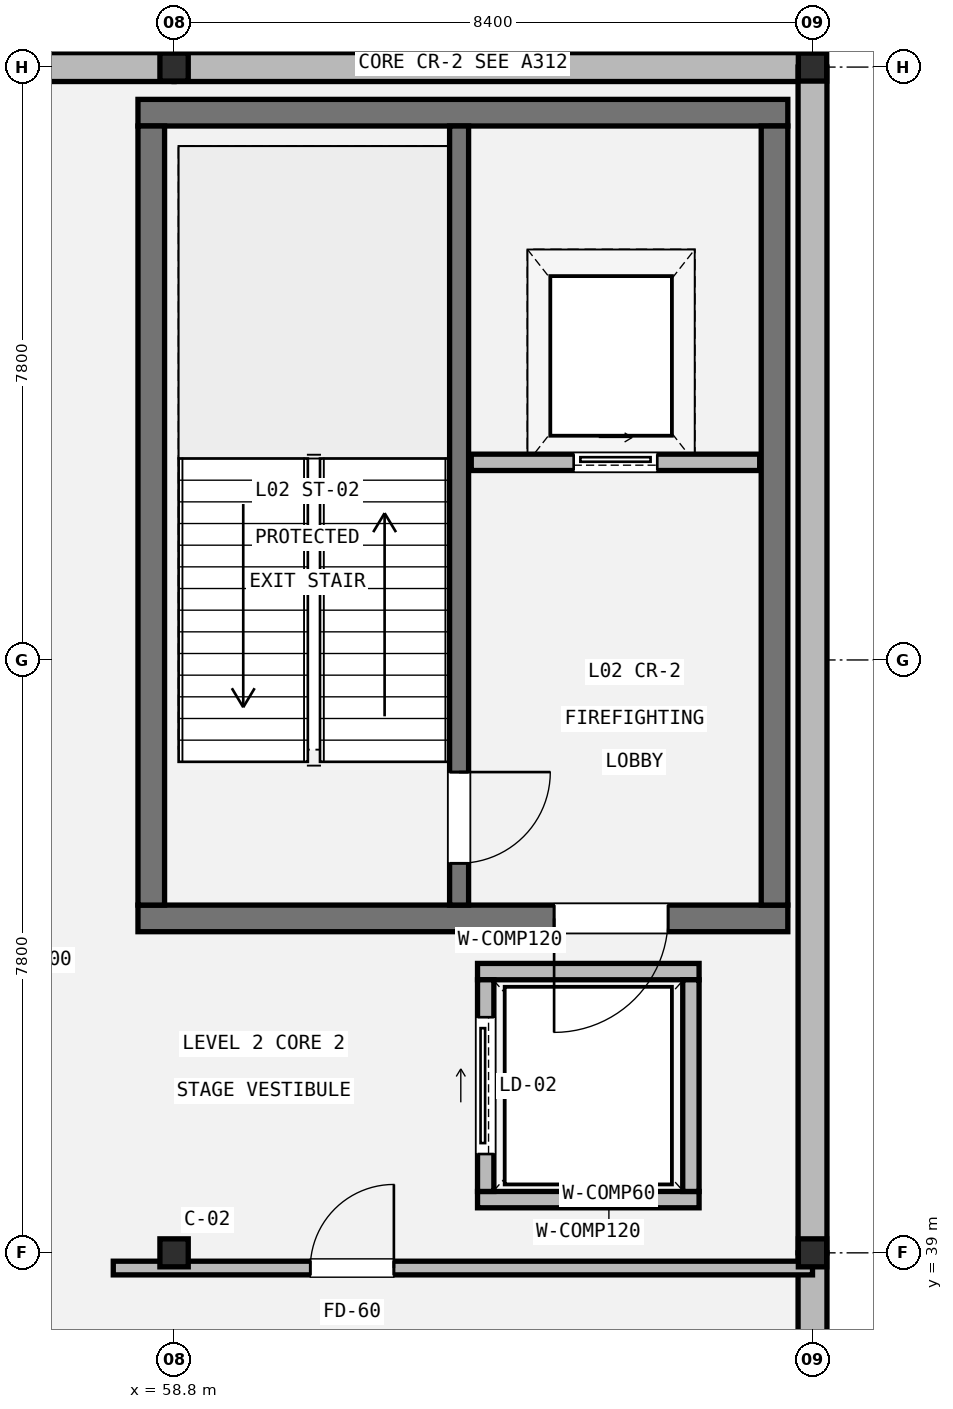
"""IFC4 building model, lengths in metres.
Left out: names, types, materials, properties, quantities, classifications, styles, units other than length and angle.
Written with IfcOpenShell. Run it as: python <this file> out.ifc"""

import sys

from ifc_helpers import new_model, si_unit, direction, frame, frame_2d, origin, origin_2d, place, context, subcontext, project, spatial, rectangle, i_section, extrude, element, fill, save


model = new_model("IFC4")
c1 = context("Model", 3, precision=1e-05, world=origin(), true_north=direction((0.0, 1.0)))
c2 = subcontext(c1, "Body", "Model", "MODEL_VIEW")
j1 = project(units=[si_unit("LENGTHUNIT", "METRE"), si_unit("PLANEANGLEUNIT", "RADIAN")], contexts=[c1])
p1 = place(None, origin())
s1 = spatial("IfcSite", under=j1, at=p1, CompositionType="ELEMENT")
p2 = place(p1, origin())
s2 = spatial("IfcBuilding", under=s1, at=p2, CompositionType="ELEMENT")
p3 = place(p2, frame((0.0, 0.0, 10.2)))
s3 = spatial("IfcBuildingStorey", under=s2, at=p3, CompositionType="ELEMENT", Elevation=10.2)
for number, where, z_axis, x_axis in (
    (1, (58.8, 39.0, 0.0), (0.0, 0.0, 1.0), (1.0, 0.0, 0.0)),
    (2, (58.8, 54.6, 0.0), (0.0, 0.0, 1.0), (1.0, 0.0, 0.0)),
    (3, (67.2, 39.0, 0.0), (0.0, 0.0, 1.0), (1.0, 0.0, 0.0)),
    (4, (67.2, 54.6, 0.0), (0.0, 0.0, 1.0), (1.0, 0.0, 0.0)),
):
    element("IfcColumn", number, at=place(p3, frame(where, z_axis=z_axis, x_axis=x_axis)), inside=s3, PredefinedType="COLUMN", context=c2, shape_type="SweptSolid", body=[
        extrude(i_section(OverallWidth=0.373, OverallDepth=0.368, WebThickness=0.014, FlangeThickness=0.024, FilletRadius=0.015, at=origin_2d()), origin(), (0.0, 0.0, 1.0), 4.8),
    ])
p4 = place(p3, frame((50.4, 54.6, 0.0), z_axis=(0.0, 0.0, 1.0), x_axis=(1.0, 0.0, 0.0)))
e5 = element("IfcWall", 5, at=p4, inside=s3, PredefinedType="STANDARD", context=c2, shape_type="SweptSolid", body=[
    extrude(rectangle(XDim=8.4, YDim=0.38, at=frame_2d((4.2, 0.0))), origin(), (0.0, 0.0, 1.0), 4.053),
])
p5 = place(p3, frame((58.8, 54.6, 0.0), z_axis=(0.0, 0.0, 1.0), x_axis=(1.0, 0.0, 0.0)))
e6 = element("IfcWall", 6, at=p5, inside=s3, PredefinedType="STANDARD", context=c2, shape_type="SweptSolid", body=[
    extrude(rectangle(XDim=8.4, YDim=0.38, at=frame_2d((4.2, 0.0))), origin(), (0.0, 0.0, 1.0), 3.822),
])
p6 = place(p3, frame((67.2, 54.6, 0.0), z_axis=(0.0, 0.0, 1.0), x_axis=(0.0, -1.0, 0.0)))
e7 = element("IfcWall", 7, at=p6, inside=s3, PredefinedType="STANDARD", context=c2, shape_type="SweptSolid", body=[
    extrude(rectangle(XDim=15.6, YDim=0.38, at=frame_2d((7.8, 0.0))), origin(), (0.0, 0.0, 1.0), 3.822),
])
p7 = place(p3, frame((67.2, 39.0, 0.0), z_axis=(0.0, 0.0, 1.0), x_axis=(0.0, -1.0, 0.0)))
e8 = element("IfcWall", 8, at=p7, inside=s3, PredefinedType="STANDARD", context=c2, shape_type="SweptSolid", body=[
    extrude(rectangle(XDim=7.8, YDim=0.38, at=frame_2d((3.9, 0.0))), origin(), (0.0, 0.0, 1.0), 3.822),
])
p8 = place(p3, frame((66.875, 43.4, 0.0), z_axis=(0.0, 0.0, 1.0), x_axis=(-1.0, 0.0, 0.0)))
e9 = element("IfcWall", 9, at=p8, inside=s3, PredefinedType="SHEAR", context=c2, shape_type="SweptSolid", body=[
    extrude(rectangle(XDim=8.55, YDim=0.35, at=frame_2d((4.275, 0.0))), origin(), (0.0, 0.0, 1.0), 4.6),
])
p9 = place(p8, frame((1.575, 0.0, 0.0)))
e10 = element("IfcOpeningElement", 10, at=p9, cuts=e9, PredefinedType="OPENING", context=c2, shape_type="SweptSolid", body=[
    extrude(rectangle(XDim=1.5, YDim=2.15, at=frame_2d((0.75, 1.075))), frame((0.0, 0.185, 0.0), z_axis=(0.0, -1.0, 0.0), x_axis=(1.0, 0.0, 0.0)), (0.0, 0.0, 1.0), 0.37),
])
p10 = place(p3, frame((58.325, 54.0, 0.0), z_axis=(0.0, 0.0, 1.0), x_axis=(1.0, 0.0, 0.0)))
e11 = element("IfcWall", 11, at=p10, inside=s3, PredefinedType="SHEAR", context=c2, shape_type="SweptSolid", body=[
    extrude(rectangle(XDim=8.55, YDim=0.35, at=frame_2d((4.275, 0.0))), origin(), (0.0, 0.0, 1.0), 4.6),
])
for number, where, z_axis, x_axis in (
    (12, (58.5, 43.575, 0.0), (0.0, 0.0, 1.0), (0.0, 1.0, 0.0)),
    (13, (66.7, 53.825, 0.0), (0.0, 0.0, 1.0), (0.0, -1.0, 0.0)),
):
    element("IfcWall", number, at=place(p3, frame(where, z_axis=z_axis, x_axis=x_axis)), inside=s3, PredefinedType="SHEAR", context=c2, shape_type="SweptSolid", body=[
        extrude(rectangle(XDim=10.25, YDim=0.35, at=frame_2d((5.125, 0.0))), origin(), (0.0, 0.0, 1.0), 4.6),
    ])
p11 = place(p3, frame((62.55, 53.825, 0.0), z_axis=(0.0, 0.0, 1.0), x_axis=(0.0, -1.0, 0.0)))
e14 = element("IfcWall", 14, at=p11, inside=s3, PredefinedType="SHEAR", context=c2, shape_type="SweptSolid", body=[
    extrude(rectangle(XDim=10.25, YDim=0.25, at=frame_2d((5.125, 0.0))), origin(), (0.0, 0.0, 1.0), 4.6),
])
p12 = place(p11, frame((8.5, 0.0, 0.0)))
e15 = element("IfcOpeningElement", 15, at=p12, cuts=e14, PredefinedType="OPENING", context=c2, shape_type="SweptSolid", body=[
    extrude(rectangle(XDim=1.2, YDim=2.15, at=frame_2d((0.6, 1.075))), frame((0.0, 0.135, 0.0), z_axis=(0.0, -1.0, 0.0), x_axis=(1.0, 0.0, 0.0)), (0.0, 0.0, 1.0), 0.27),
])
p13 = place(p3, frame((62.71, 49.4, 0.0), z_axis=(0.0, 0.0, 1.0), x_axis=(1.0, 0.0, 0.0)))
e16 = element("IfcWall", 16, at=p13, inside=s3, PredefinedType="STANDARD", context=c2, shape_type="SweptSolid", body=[
    extrude(rectangle(XDim=3.795, YDim=0.215, at=frame_2d((1.897, 0.0))), origin(), (0.0, 0.0, 1.0), 4.592),
])
p14 = place(p13, frame((1.347, 0.0, 0.0)))
e17 = element("IfcOpeningElement", 17, at=p14, cuts=e16, PredefinedType="OPENING", context=c2, shape_type="SweptSolid", body=[
    extrude(rectangle(XDim=1.1, YDim=2.2, at=frame_2d((0.55, 1.1))), frame((0.0, 0.117, 0.0), z_axis=(0.0, -1.0, 0.0), x_axis=(1.0, 0.0, 0.0)), (0.0, 0.0, 1.0), 0.235),
])
for number, where, z_axis, x_axis in (
    (18, (65.708, 39.7, 0.0), (0.0, 0.0, 1.0), (-1.0, 0.0, 0.0)),
    (19, (62.792, 42.7, 0.0), (0.0, 0.0, 1.0), (1.0, 0.0, 0.0)),
):
    element("IfcWall", number, at=place(p3, frame(where, z_axis=z_axis, x_axis=x_axis)), inside=s3, PredefinedType="STANDARD", context=c2, shape_type="SweptSolid", body=[
        extrude(rectangle(XDim=2.915, YDim=0.215, at=frame_2d((1.458, 0.0))), origin(), (0.0, 0.0, 1.0), 4.592),
    ])
p15 = place(p3, frame((62.9, 39.808, 0.0), z_axis=(0.0, 0.0, 1.0), x_axis=(0.0, 1.0, 0.0)))
e20 = element("IfcWall", 20, at=p15, inside=s3, PredefinedType="STANDARD", context=c2, shape_type="SweptSolid", body=[
    extrude(rectangle(XDim=2.785, YDim=0.215, at=frame_2d((1.393, 0.0))), origin(), (0.0, 0.0, 1.0), 4.592),
])
p16 = place(p15, frame((0.492, 0.0, 0.0)))
e21 = element("IfcOpeningElement", 21, at=p16, cuts=e20, PredefinedType="OPENING", context=c2, shape_type="SweptSolid", body=[
    extrude(rectangle(XDim=1.8, YDim=2.4, at=frame_2d((0.9, 1.2))), frame((0.0, 0.117, 0.0), z_axis=(0.0, -1.0, 0.0), x_axis=(1.0, 0.0, 0.0)), (0.0, 0.0, 1.0), 0.235),
])
p17 = place(p3, frame((65.6, 42.593, 0.0), z_axis=(0.0, 0.0, 1.0), x_axis=(0.0, -1.0, 0.0)))
e22 = element("IfcWall", 22, at=p17, inside=s3, PredefinedType="STANDARD", context=c2, shape_type="SweptSolid", body=[
    extrude(rectangle(XDim=2.785, YDim=0.215, at=frame_2d((1.393, 0.0))), origin(), (0.0, 0.0, 1.0), 4.592),
])
p18 = place(p3, frame((58.0, 38.8, 0.0), z_axis=(0.0, 0.0, 1.0), x_axis=(1.0, 0.0, 0.0)))
e23 = element("IfcWall", 23, at=p18, inside=s3, PredefinedType="STANDARD", context=c2, shape_type="SweptSolid", body=[
    extrude(rectangle(XDim=9.2, YDim=0.18, at=frame_2d((4.6, 0.0))), origin(), (0.0, 0.0, 1.0), 3.822),
])
p19 = place(p18, frame((2.592, 0.0, 0.0)))
e24 = element("IfcOpeningElement", 24, at=p19, cuts=e23, PredefinedType="OPENING", context=c2, shape_type="SweptSolid", body=[
    extrude(rectangle(XDim=1.1, YDim=2.15, at=frame_2d((0.55, 1.075))), frame((0.0, 0.1, 0.0), z_axis=(0.0, -1.0, 0.0), x_axis=(1.0, 0.0, 0.0)), (0.0, 0.0, 1.0), 0.2),
])
p20 = place(p12, origin())
e25 = element("IfcDoor", 25, at=p20, inside=s3, OperationType="SINGLE_SWING_LEFT", PredefinedType="DOOR", context=c2, shape_type="SweptSolid", body=[
    extrude(rectangle(XDim=1.2, YDim=2.15, at=frame_2d((0.6, 1.075))), frame((0.0, 0.025, 0.0), z_axis=(0.0, -1.0, 0.0), x_axis=(1.0, 0.0, 0.0)), (0.0, 0.0, 1.0), 0.05),
])
fill(e15, e25)
p21 = place(p9, origin())
e26 = element("IfcDoor", 26, at=p21, inside=s3, OperationType="SINGLE_SWING_RIGHT", PredefinedType="DOOR", context=c2, shape_type="SweptSolid", body=[
    extrude(rectangle(XDim=1.5, YDim=2.15, at=frame_2d((0.75, 1.075))), frame((0.0, 0.025, 0.0), z_axis=(0.0, -1.0, 0.0), x_axis=(1.0, 0.0, 0.0)), (0.0, 0.0, 1.0), 0.05),
])
fill(e10, e26)
p22 = place(p14, origin())
e27 = element("IfcDoor", 27, at=p22, inside=s3, OperationType="SLIDING_TO_RIGHT", PredefinedType="DOOR", context=c2, shape_type="SweptSolid", body=[
    extrude(rectangle(XDim=1.1, YDim=2.2, at=frame_2d((0.55, 1.1))), frame((0.0, 0.025, 0.0), z_axis=(0.0, -1.0, 0.0), x_axis=(1.0, 0.0, 0.0)), (0.0, 0.0, 1.0), 0.05),
])
fill(e17, e27)
p23 = place(p16, origin())
e28 = element("IfcDoor", 28, at=p23, inside=s3, OperationType="SLIDING_TO_RIGHT", PredefinedType="DOOR", context=c2, shape_type="SweptSolid", body=[
    extrude(rectangle(XDim=1.8, YDim=2.4, at=frame_2d((0.9, 1.2))), frame((0.0, 0.025, 0.0), z_axis=(0.0, -1.0, 0.0), x_axis=(1.0, 0.0, 0.0)), (0.0, 0.0, 1.0), 0.05),
])
fill(e21, e28)
p24 = place(p19, origin())
e29 = element("IfcDoor", 29, at=p24, inside=s3, OperationType="SINGLE_SWING_RIGHT", PredefinedType="DOOR", context=c2, shape_type="SweptSolid", body=[
    extrude(rectangle(XDim=1.1, YDim=2.15, at=frame_2d((0.55, 1.075))), frame((0.0, 0.025, 0.0), z_axis=(0.0, -1.0, 0.0), x_axis=(1.0, 0.0, 0.0)), (0.0, 0.0, 1.0), 0.05),
])
fill(e24, e29)
save(model, sys.argv[1])
